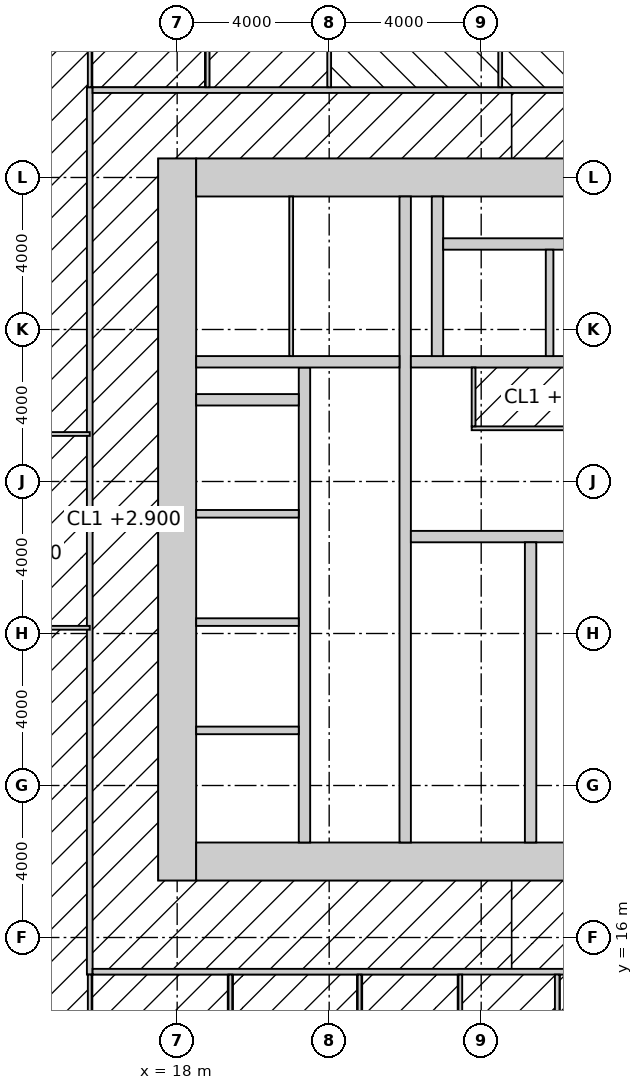
"""IFC4 building model, lengths in metres.
Left out: names, types, materials, properties, quantities, classifications, styles, units other than length and angle.
Written with IfcOpenShell. Run it as: python <this file> out.ifc"""

import sys

from ifc_helpers import new_model, si_unit, direction, frame, frame_2d, origin, place, context, subcontext, project, spatial, rectangle, extrude, element, fill, save


model = new_model("IFC4")
c1 = context("Model", 3, precision=1e-05, world=origin(), true_north=direction((0.0, 1.0)))
c2 = subcontext(c1, "Body", "Model", "MODEL_VIEW")
j1 = project(units=[si_unit("LENGTHUNIT", "METRE"), si_unit("PLANEANGLEUNIT", "RADIAN")], contexts=[c1])
p1 = place(None, origin())
s1 = spatial("IfcSite", under=j1, at=p1, CompositionType="ELEMENT")
p2 = place(p1, origin())
s2 = spatial("IfcBuilding", under=s1, at=p2, CompositionType="ELEMENT")
p3 = place(p2, frame((0.0, 0.0, 81.4)))
s3 = spatial("IfcBuildingStorey", under=s2, at=p3, CompositionType="ELEMENT", Elevation=81.4)
p4 = place(p3, frame((18.0, 17.5, -0.15), z_axis=(0.0, 0.0, 1.0), x_axis=(0.0, 1.0, 0.0)))
e1 = element("IfcWall", 1, at=p4, inside=s3, PredefinedType="SHEAR", context=c2, shape_type="SweptSolid", body=[
    extrude(rectangle(XDim=19.0, YDim=1.0, at=frame_2d((9.5, 0.0))), origin(), (0.0, 0.0, 1.0), 4.0),
])
p5 = place(p3, frame((18.5, 18.0, -0.15), z_axis=(0.0, 0.0, 1.0), x_axis=(1.0, 0.0, 0.0)))
e2 = element("IfcWall", 2, at=p5, inside=s3, PredefinedType="SHEAR", context=c2, shape_type="SweptSolid", body=[
    extrude(rectangle(XDim=17.6, YDim=1.0, at=frame_2d((8.8, 0.0))), origin(), (0.0, 0.0, 1.0), 4.0),
])
p6 = place(p5, frame((3.45, 0.0, 0.15)))
e3 = element("IfcOpeningElement", 3, at=p6, cuts=e2, PredefinedType="OPENING", context=c2, shape_type="SweptSolid", body=[
    extrude(rectangle(XDim=1.5, YDim=2.4, at=frame_2d((0.75, 1.2))), frame((0.0, 0.51, 0.0), z_axis=(0.0, -1.0, 0.0), x_axis=(1.0, 0.0, 0.0)), (0.0, 0.0, 1.0), 1.02),
])
p7 = place(p3, frame((18.5, 36.0, -0.15), z_axis=(0.0, 0.0, 1.0), x_axis=(1.0, 0.0, 0.0)))
e4 = element("IfcWall", 4, at=p7, inside=s3, PredefinedType="SHEAR", context=c2, shape_type="SweptSolid", body=[
    extrude(rectangle(XDim=17.6, YDim=1.0, at=frame_2d((8.8, 0.0))), origin(), (0.0, 0.0, 1.0), 4.0),
])
p8 = place(p3, frame((24.0, 18.5, -0.15), z_axis=(0.0, 0.0, 1.0), x_axis=(0.0, 1.0, 0.0)))
e5 = element("IfcWall", 5, at=p8, inside=s3, PredefinedType="SHEAR", context=c2, shape_type="SweptSolid", body=[
    extrude(rectangle(XDim=17.0, YDim=0.3, at=frame_2d((8.5, 0.0))), origin(), (0.0, 0.0, 1.0), 4.0),
])
p9 = place(p8, frame((9.6, 0.0, 0.15)))
e6 = element("IfcOpeningElement", 6, at=p9, cuts=e5, PredefinedType="OPENING", context=c2, shape_type="SweptSolid", body=[
    extrude(rectangle(XDim=1.5, YDim=2.4, at=frame_2d((0.75, 1.2))), frame((0.0, 0.16, 0.0), z_axis=(0.0, -1.0, 0.0), x_axis=(1.0, 0.0, 0.0)), (0.0, 0.0, 1.0), 0.32),
])
p10 = place(p3, frame((24.15, 26.55, -0.15), z_axis=(0.0, 0.0, 1.0), x_axis=(1.0, 0.0, 0.0)))
e7 = element("IfcWall", 7, at=p10, inside=s3, PredefinedType="SHEAR", context=c2, shape_type="SweptSolid", body=[
    extrude(rectangle(XDim=11.25, YDim=0.3, at=frame_2d((5.625, 0.0))), origin(), (0.0, 0.0, 1.0), 4.0),
])
p11 = place(p10, frame((9.25, 0.0, 0.15)))
e8 = element("IfcOpeningElement", 8, at=p11, cuts=e7, PredefinedType="OPENING", context=c2, shape_type="SweptSolid", body=[
    extrude(rectangle(XDim=1.0, YDim=2.2, at=frame_2d((0.5, 1.1))), frame((0.0, 0.16, 0.0), z_axis=(0.0, -1.0, 0.0), x_axis=(1.0, 0.0, 0.0)), (0.0, 0.0, 1.0), 0.32),
])
p12 = place(p10, frame((4.9, 0.0, 0.15)))
e9 = element("IfcOpeningElement", 9, at=p12, cuts=e7, PredefinedType="OPENING", context=c2, shape_type="SweptSolid", body=[
    extrude(rectangle(XDim=1.5, YDim=2.4, at=frame_2d((0.75, 1.2))), frame((0.0, 0.16, 0.0), z_axis=(0.0, -1.0, 0.0), x_axis=(1.0, 0.0, 0.0)), (0.0, 0.0, 1.0), 0.32),
])
p13 = place(p3, frame((27.3, 18.5, -0.15), z_axis=(0.0, 0.0, 1.0), x_axis=(0.0, 1.0, 0.0)))
e10 = element("IfcWall", 10, at=p13, inside=s3, PredefinedType="SHEAR", context=c2, shape_type="SweptSolid", body=[
    extrude(rectangle(XDim=7.9, YDim=0.3, at=frame_2d((3.95, 0.0))), origin(), (0.0, 0.0, 1.0), 4.0),
])
p14 = place(p13, frame((6.4, 0.0, 0.15)))
e11 = element("IfcOpeningElement", 11, at=p14, cuts=e10, PredefinedType="OPENING", context=c2, shape_type="SweptSolid", body=[
    extrude(rectangle(XDim=1.0, YDim=2.2, at=frame_2d((0.5, 1.1))), frame((0.0, 0.16, 0.0), z_axis=(0.0, -1.0, 0.0), x_axis=(1.0, 0.0, 0.0)), (0.0, 0.0, 1.0), 0.32),
])
p15 = place(p3, frame((24.15, 31.15, -0.15), z_axis=(0.0, 0.0, 1.0), x_axis=(1.0, 0.0, 0.0)))
e12 = element("IfcWall", 12, at=p15, inside=s3, PredefinedType="SHEAR", context=c2, shape_type="SweptSolid", body=[
    extrude(rectangle(XDim=11.25, YDim=0.3, at=frame_2d((5.625, 0.0))), origin(), (0.0, 0.0, 1.0), 4.0),
])
p16 = place(p15, frame((7.25, 0.0, 0.15)))
e13 = element("IfcOpeningElement", 13, at=p16, cuts=e12, PredefinedType="OPENING", context=c2, shape_type="SweptSolid", body=[
    extrude(rectangle(XDim=1.4, YDim=2.4, at=frame_2d((0.7, 1.2))), frame((0.0, 0.16, 0.0), z_axis=(0.0, -1.0, 0.0), x_axis=(1.0, 0.0, 0.0)), (0.0, 0.0, 1.0), 0.32),
])
p17 = place(p3, frame((21.35, 18.5, -0.15), z_axis=(0.0, 0.0, 1.0), x_axis=(0.0, 1.0, 0.0)))
e14 = element("IfcWall", 14, at=p17, inside=s3, PredefinedType="SHEAR", context=c2, shape_type="SweptSolid", body=[
    extrude(rectangle(XDim=12.5, YDim=0.3, at=frame_2d((6.25, 0.0))), origin(), (0.0, 0.0, 1.0), 4.0),
])
p18 = place(p17, frame((0.875, 0.0, 0.15)))
e15 = element("IfcOpeningElement", 15, at=p18, cuts=e14, PredefinedType="OPENING", context=c2, shape_type="SweptSolid", body=[
    extrude(rectangle(XDim=1.1, YDim=2.2, at=frame_2d((0.55, 1.1))), frame((0.0, 0.16, 0.0), z_axis=(0.0, -1.0, 0.0), x_axis=(1.0, 0.0, 0.0)), (0.0, 0.0, 1.0), 0.32),
])
p19 = place(p17, frame((3.825, 0.0, 0.15)))
e16 = element("IfcOpeningElement", 16, at=p19, cuts=e14, PredefinedType="OPENING", context=c2, shape_type="SweptSolid", body=[
    extrude(rectangle(XDim=1.1, YDim=2.2, at=frame_2d((0.55, 1.1))), frame((0.0, 0.16, 0.0), z_axis=(0.0, -1.0, 0.0), x_axis=(1.0, 0.0, 0.0)), (0.0, 0.0, 1.0), 0.32),
])
p20 = place(p17, frame((6.675, 0.0, 0.15)))
e17 = element("IfcOpeningElement", 17, at=p20, cuts=e14, PredefinedType="OPENING", context=c2, shape_type="SweptSolid", body=[
    extrude(rectangle(XDim=1.1, YDim=2.2, at=frame_2d((0.55, 1.1))), frame((0.0, 0.16, 0.0), z_axis=(0.0, -1.0, 0.0), x_axis=(1.0, 0.0, 0.0)), (0.0, 0.0, 1.0), 0.32),
])
p21 = place(p17, frame((9.575, 0.0, 0.15)))
e18 = element("IfcOpeningElement", 18, at=p21, cuts=e14, PredefinedType="OPENING", context=c2, shape_type="SweptSolid", body=[
    extrude(rectangle(XDim=1.1, YDim=2.2, at=frame_2d((0.55, 1.1))), frame((0.0, 0.16, 0.0), z_axis=(0.0, -1.0, 0.0), x_axis=(1.0, 0.0, 0.0)), (0.0, 0.0, 1.0), 0.32),
])
p22 = place(p3, frame((18.5, 31.15, -0.15), z_axis=(0.0, 0.0, 1.0), x_axis=(1.0, 0.0, 0.0)))
e19 = element("IfcWall", 19, at=p22, inside=s3, PredefinedType="SHEAR", context=c2, shape_type="SweptSolid", body=[
    extrude(rectangle(XDim=5.35, YDim=0.3, at=frame_2d((2.675, 0.0))), origin(), (0.0, 0.0, 1.0), 4.0),
])
p23 = place(p22, frame((3.4, 0.0, 0.15)))
e20 = element("IfcOpeningElement", 20, at=p23, cuts=e19, PredefinedType="OPENING", context=c2, shape_type="SweptSolid", body=[
    extrude(rectangle(XDim=1.0, YDim=2.2, at=frame_2d((0.5, 1.1))), frame((0.0, 0.16, 0.0), z_axis=(0.0, -1.0, 0.0), x_axis=(1.0, 0.0, 0.0)), (0.0, 0.0, 1.0), 0.32),
])
p24 = place(p3, frame((18.5, 30.15, -0.15), z_axis=(0.0, 0.0, 1.0), x_axis=(1.0, 0.0, 0.0)))
e21 = element("IfcWall", 21, at=p24, inside=s3, PredefinedType="SHEAR", context=c2, shape_type="SweptSolid", body=[
    extrude(rectangle(XDim=2.7, YDim=0.3, at=frame_2d((1.35, 0.0))), origin(), (0.0, 0.0, 1.0), 4.0),
])
p25 = place(p3, frame((24.85, 31.3, -0.15), z_axis=(0.0, 0.0, 1.0), x_axis=(0.0, 1.0, 0.0)))
e22 = element("IfcWall", 22, at=p25, inside=s3, PredefinedType="SHEAR", context=c2, shape_type="SweptSolid", body=[
    extrude(rectangle(XDim=4.2, YDim=0.3, at=frame_2d((2.1, 0.0))), origin(), (0.0, 0.0, 1.0), 4.0),
])
p26 = place(p3, frame((25.0, 34.25, -0.15), z_axis=(0.0, 0.0, 1.0), x_axis=(1.0, 0.0, 0.0)))
e23 = element("IfcWall", 23, at=p26, inside=s3, PredefinedType="SHEAR", context=c2, shape_type="SweptSolid", body=[
    extrude(rectangle(XDim=8.6, YDim=0.3, at=frame_2d((4.3, 0.0))), origin(), (0.0, 0.0, 1.0), 4.0),
])
p27 = place(p3, frame((27.8, 31.3, -0.15), z_axis=(0.0, 0.0, 1.0), x_axis=(0.0, 1.0, 0.0)))
e24 = element("IfcWall", 24, at=p27, inside=s3, PredefinedType="SOLIDWALL", context=c2, shape_type="SweptSolid", body=[
    extrude(rectangle(XDim=2.8, YDim=0.2, at=frame_2d((1.4, 0.0))), origin(), (0.0, 0.0, 1.0), 4.0),
])
for number, where, z_axis, x_axis in (
    (25, (18.5, 21.45, -0.15), (0.0, 0.0, 1.0), (1.0, 0.0, 0.0)),
    (26, (18.5, 24.3, -0.15), (0.0, 0.0, 1.0), (1.0, 0.0, 0.0)),
    (27, (18.5, 27.15, -0.15), (0.0, 0.0, 1.0), (1.0, 0.0, 0.0)),
):
    element("IfcWall", number, at=place(p3, frame(where, z_axis=z_axis, x_axis=x_axis)), inside=s3, PredefinedType="SOLIDWALL", context=c2, shape_type="SweptSolid", body=[
        extrude(rectangle(XDim=2.7, YDim=0.2, at=frame_2d((1.35, 0.0))), origin(), (0.0, 0.0, 1.0), 4.0),
    ])
p28 = place(p3, frame((21.0, 31.3, 0.0), z_axis=(0.0, 0.0, 1.0), x_axis=(0.0, 1.0, 0.0)))
e28 = element("IfcWall", 28, at=p28, inside=s3, PredefinedType="PARTITIONING", context=c2, shape_type="SweptSolid", body=[
    extrude(rectangle(XDim=4.2, YDim=0.1, at=frame_2d((2.1, 0.0))), origin(), (0.0, 0.0, 1.0), 3.85),
])
p29 = place(p28, frame((1.55, 0.0, 0.0)))
e29 = element("IfcOpeningElement", 29, at=p29, cuts=e28, PredefinedType="OPENING", context=c2, shape_type="SweptSolid", body=[
    extrude(rectangle(XDim=1.0, YDim=2.2, at=frame_2d((0.5, 1.1))), frame((0.0, 0.06, 0.0), z_axis=(0.0, -1.0, 0.0), x_axis=(1.0, 0.0, 0.0)), (0.0, 0.0, 1.0), 0.12),
])
p30 = place(p3, frame((25.75, 29.4, 0.0), z_axis=(0.0, 0.0, 1.0), x_axis=(1.0, 0.0, 0.0)))
e30 = element("IfcWall", 30, at=p30, inside=s3, PredefinedType="PARTITIONING", context=c2, shape_type="SweptSolid", body=[
    extrude(rectangle(XDim=4.7, YDim=0.1, at=frame_2d((2.35, 0.0))), origin(), (0.0, 0.0, 1.0), 3.85),
])
p31 = place(p30, frame((1.85, 0.0, 0.0)))
e31 = element("IfcOpeningElement", 31, at=p31, cuts=e30, PredefinedType="OPENING", context=c2, shape_type="SweptSolid", body=[
    extrude(rectangle(XDim=1.0, YDim=2.2, at=frame_2d((0.5, 1.1))), frame((0.0, 0.06, 0.0), z_axis=(0.0, -1.0, 0.0), x_axis=(1.0, 0.0, 0.0)), (0.0, 0.0, 1.0), 0.12),
])
p32 = place(p3, frame((25.8, 29.45, 0.0), z_axis=(0.0, 0.0, 1.0), x_axis=(0.0, 1.0, 0.0)))
e32 = element("IfcWall", 32, at=p32, inside=s3, PredefinedType="PARTITIONING", context=c2, shape_type="SweptSolid", body=[
    extrude(rectangle(XDim=1.55, YDim=0.1, at=frame_2d((0.775, 0.0))), origin(), (0.0, 0.0, 1.0), 3.85),
])
p33 = place(p3, frame((15.7, 15.025, 0.0), z_axis=(0.0, 0.0, 1.0), x_axis=(0.0, 1.0, 0.0)))
e33 = element("IfcWall", 33, at=p33, inside=s3, PredefinedType="PARTITIONING", context=c2, shape_type="SweptSolid", body=[
    extrude(rectangle(XDim=23.35, YDim=0.15, at=frame_2d((11.675, 0.0))), origin(), (0.0, 0.0, 1.0), 3.85),
])
p34 = place(p33, frame((10.775, 0.0, 0.0)))
e34 = element("IfcOpeningElement", 34, at=p34, cuts=e33, PredefinedType="OPENING", context=c2, shape_type="SweptSolid", body=[
    extrude(rectangle(XDim=1.8, YDim=2.4, at=frame_2d((0.9, 1.2))), frame((0.0, 0.085, 0.0), z_axis=(0.0, -1.0, 0.0), x_axis=(1.0, 0.0, 0.0)), (0.0, 0.0, 1.0), 0.17),
])
p35 = place(p3, frame((15.775, 15.1, 0.0), z_axis=(0.0, 0.0, 1.0), x_axis=(1.0, 0.0, 0.0)))
e35 = element("IfcWall", 35, at=p35, inside=s3, PredefinedType="PARTITIONING", context=c2, shape_type="SweptSolid", body=[
    extrude(rectangle(XDim=22.05, YDim=0.15, at=frame_2d((11.025, 0.0))), origin(), (0.0, 0.0, 1.0), 3.85),
])
p36 = place(p3, frame((15.775, 38.3, 0.0), z_axis=(0.0, 0.0, 1.0), x_axis=(1.0, 0.0, 0.0)))
e36 = element("IfcWall", 36, at=p36, inside=s3, PredefinedType="PARTITIONING", context=c2, shape_type="SweptSolid", body=[
    extrude(rectangle(XDim=22.05, YDim=0.15, at=frame_2d((11.025, 0.0))), origin(), (0.0, 0.0, 1.0), 3.85),
])
p37 = place(p36, frame((7.975, 0.0, 0.0)))
e37 = element("IfcOpeningElement", 37, at=p37, cuts=e36, PredefinedType="OPENING", context=c2, shape_type="SweptSolid", body=[
    extrude(rectangle(XDim=0.9, YDim=2.1, at=frame_2d((0.45, 1.05))), frame((0.0, 0.085, 0.0), z_axis=(0.0, -1.0, 0.0), x_axis=(1.0, 0.0, 0.0)), (0.0, 0.0, 1.0), 0.17),
])
p38 = place(p36, frame((11.725, 0.0, 0.0)))
e38 = element("IfcOpeningElement", 38, at=p38, cuts=e36, PredefinedType="OPENING", context=c2, shape_type="SweptSolid", body=[
    extrude(rectangle(XDim=1.0, YDim=2.1, at=frame_2d((0.5, 1.05))), frame((0.0, 0.085, 0.0), z_axis=(0.0, -1.0, 0.0), x_axis=(1.0, 0.0, 0.0)), (0.0, 0.0, 1.0), 0.17),
])
p39 = place(p36, frame((15.575, 0.0, 0.0)))
e39 = element("IfcOpeningElement", 39, at=p39, cuts=e36, PredefinedType="OPENING", context=c2, shape_type="SweptSolid", body=[
    extrude(rectangle(XDim=0.9, YDim=2.1, at=frame_2d((0.45, 1.05))), frame((0.0, 0.085, 0.0), z_axis=(0.0, -1.0, 0.0), x_axis=(1.0, 0.0, 0.0)), (0.0, 0.0, 1.0), 0.17),
])
p40 = place(p3, frame((22.0, 38.375, 0.0), z_axis=(0.0, 0.0, 1.0), x_axis=(0.0, 1.0, 0.0)))
e40 = element("IfcWall", 40, at=p40, inside=s3, PredefinedType="PARTITIONING", context=c2, shape_type="SweptSolid", body=[
    extrude(rectangle(XDim=3.675, YDim=0.1, at=frame_2d((1.837, 0.0))), origin(), (0.0, 0.0, 1.0), 2.95),
])
p41 = place(p3, frame((26.5, 38.375, 0.0), z_axis=(0.0, 0.0, 1.0), x_axis=(0.0, 1.0, 0.0)))
e41 = element("IfcWall", 41, at=p41, inside=s3, PredefinedType="PARTITIONING", context=c2, shape_type="SweptSolid", body=[
    extrude(rectangle(XDim=3.575, YDim=0.1, at=frame_2d((1.788, 0.0))), origin(), (0.0, 0.0, 1.0), 3.85),
])
p42 = place(p3, frame((28.0, 0.3, 0.0), z_axis=(0.0, 0.0, 1.0), x_axis=(0.0, 1.0, 0.0)))
e42 = element("IfcWall", 42, at=p42, inside=s3, PredefinedType="PARTITIONING", context=c2, shape_type="SweptSolid", body=[
    extrude(rectangle(XDim=14.725, YDim=0.12, at=frame_2d((7.362, 0.0))), origin(), (0.0, 0.0, 1.0), 3.85),
])
p43 = place(p3, frame((15.7, 10.35, 0.0), z_axis=(0.0, 0.0, 1.0), x_axis=(0.0, 1.0, 0.0)))
e43 = element("IfcWall", 43, at=p43, inside=s3, PredefinedType="PARTITIONING", context=c2, shape_type="SweptSolid", body=[
    extrude(rectangle(XDim=4.675, YDim=0.1, at=frame_2d((2.337, 0.0))), origin(), (0.0, 0.0, 1.0), 3.85),
])
for number, where, z_axis, x_axis in (
    (44, (15.7, 38.375, 0.0), (0.0, 0.0, 1.0), (0.0, 1.0, 0.0)),
    (45, (18.8, 38.375, 0.0), (0.0, 0.0, 1.0), (0.0, 1.0, 0.0)),
):
    element("IfcWall", number, at=place(p3, frame(where, z_axis=z_axis, x_axis=x_axis)), inside=s3, PredefinedType="PARTITIONING", context=c2, shape_type="SweptSolid", body=[
        extrude(rectangle(XDim=3.475, YDim=0.1, at=frame_2d((1.738, 0.0))), origin(), (0.0, 0.0, 1.0), 3.85),
    ])
for number, where, z_axis, x_axis in (
    (46, (19.4, 10.35, 0.0), (0.0, 0.0, 1.0), (0.0, 1.0, 0.0)),
    (47, (22.8, 10.35, 0.0), (0.0, 0.0, 1.0), (0.0, 1.0, 0.0)),
    (48, (25.45, 10.35, 0.0), (0.0, 0.0, 1.0), (0.0, 1.0, 0.0)),
):
    element("IfcWall", number, at=place(p3, frame(where, z_axis=z_axis, x_axis=x_axis)), inside=s3, PredefinedType="PARTITIONING", context=c2, shape_type="SweptSolid", body=[
        extrude(rectangle(XDim=4.675, YDim=0.1, at=frame_2d((2.337, 0.0))), origin(), (0.0, 0.0, 1.0), 3.85),
    ])
p44 = place(p3, frame((15.7, 29.25, 0.0), z_axis=(0.0, 0.0, 1.0), x_axis=(-1.0, 0.0, 0.0)))
e49 = element("IfcWall", 49, at=p44, inside=s3, PredefinedType="PARTITIONING", context=c2, shape_type="SweptSolid", body=[
    extrude(rectangle(XDim=4.5, YDim=0.1, at=frame_2d((2.25, 0.0))), origin(), (0.0, 0.0, 1.0), 3.85),
])
p45 = place(p3, frame((11.2, 24.15, 0.0), z_axis=(0.0, 0.0, 1.0), x_axis=(1.0, 0.0, 0.0)))
e50 = element("IfcWall", 50, at=p45, inside=s3, PredefinedType="PARTITIONING", context=c2, shape_type="SweptSolid", body=[
    extrude(rectangle(XDim=4.5, YDim=0.1, at=frame_2d((2.25, 0.0))), origin(), (0.0, 0.0, 1.0), 2.95),
])
p46 = place(p14, origin())
e51 = element("IfcDoor", 51, at=p46, inside=s3, OperationType="SINGLE_SWING_RIGHT", PredefinedType="DOOR", context=c2, shape_type="SweptSolid", body=[
    extrude(rectangle(XDim=1.0, YDim=2.2, at=frame_2d((0.5, 1.1))), frame((0.0, 0.025, 0.0), z_axis=(0.0, -1.0, 0.0), x_axis=(1.0, 0.0, 0.0)), (0.0, 0.0, 1.0), 0.05),
])
fill(e11, e51)
p47 = place(p9, origin())
e52 = element("IfcDoor", 52, at=p47, inside=s3, OperationType="DOUBLE_DOOR_DOUBLE_SWING", PredefinedType="DOOR", context=c2, shape_type="SweptSolid", body=[
    extrude(rectangle(XDim=1.5, YDim=2.4, at=frame_2d((0.75, 1.2))), frame((0.0, 0.025, 0.0), z_axis=(0.0, -1.0, 0.0), x_axis=(1.0, 0.0, 0.0)), (0.0, 0.0, 1.0), 0.05),
])
fill(e6, e52)
p48 = place(p23, origin())
e53 = element("IfcDoor", 53, at=p48, inside=s3, OperationType="SINGLE_SWING_LEFT", PredefinedType="DOOR", context=c2, shape_type="SweptSolid", body=[
    extrude(rectangle(XDim=1.0, YDim=2.2, at=frame_2d((0.5, 1.1))), frame((0.0, 0.025, 0.0), z_axis=(0.0, -1.0, 0.0), x_axis=(1.0, 0.0, 0.0)), (0.0, 0.0, 1.0), 0.05),
])
fill(e20, e53)
p49 = place(p29, origin())
e54 = element("IfcDoor", 54, at=p49, inside=s3, OperationType="SINGLE_SWING_LEFT", PredefinedType="DOOR", context=c2, shape_type="SweptSolid", body=[
    extrude(rectangle(XDim=1.0, YDim=2.2, at=frame_2d((0.5, 1.1))), frame((0.0, 0.025, 0.0), z_axis=(0.0, -1.0, 0.0), x_axis=(1.0, 0.0, 0.0)), (0.0, 0.0, 1.0), 0.05),
])
fill(e29, e54)
p50 = place(p31, origin())
e55 = element("IfcDoor", 55, at=p50, inside=s3, OperationType="SINGLE_SWING_LEFT", PredefinedType="DOOR", context=c2, shape_type="SweptSolid", body=[
    extrude(rectangle(XDim=1.0, YDim=2.2, at=frame_2d((0.5, 1.1))), frame((0.0, 0.025, 0.0), z_axis=(0.0, -1.0, 0.0), x_axis=(1.0, 0.0, 0.0)), (0.0, 0.0, 1.0), 0.05),
])
fill(e31, e55)
p51 = place(p6, origin())
e56 = element("IfcDoor", 56, at=p51, inside=s3, OperationType="DOUBLE_DOOR_DOUBLE_SWING", PredefinedType="DOOR", context=c2, shape_type="SweptSolid", body=[
    extrude(rectangle(XDim=1.5, YDim=2.4, at=frame_2d((0.75, 1.2))), frame((0.0, 0.025, 0.0), z_axis=(0.0, -1.0, 0.0), x_axis=(1.0, 0.0, 0.0)), (0.0, 0.0, 1.0), 0.05),
])
fill(e3, e56)
p52 = place(p37, origin())
e57 = element("IfcDoor", 57, at=p52, inside=s3, OperationType="SINGLE_SWING_LEFT", PredefinedType="DOOR", context=c2, shape_type="SweptSolid", body=[
    extrude(rectangle(XDim=0.9, YDim=2.1, at=frame_2d((0.45, 1.05))), frame((0.0, 0.025, 0.0), z_axis=(0.0, -1.0, 0.0), x_axis=(1.0, 0.0, 0.0)), (0.0, 0.0, 1.0), 0.05),
])
fill(e37, e57)
p53 = place(p38, origin())
e58 = element("IfcDoor", 58, at=p53, inside=s3, OperationType="SLIDING_TO_LEFT", PredefinedType="DOOR", context=c2, shape_type="SweptSolid", body=[
    extrude(rectangle(XDim=1.0, YDim=2.1, at=frame_2d((0.5, 1.05))), frame((0.0, 0.025, 0.0), z_axis=(0.0, -1.0, 0.0), x_axis=(1.0, 0.0, 0.0)), (0.0, 0.0, 1.0), 0.05),
])
fill(e38, e58)
p54 = place(p34, origin())
e59 = element("IfcDoor", 59, at=p54, inside=s3, OperationType="DOUBLE_DOOR_DOUBLE_SWING", PredefinedType="DOOR", context=c2, shape_type="SweptSolid", body=[
    extrude(rectangle(XDim=1.8, YDim=2.4, at=frame_2d((0.9, 1.2))), frame((0.0, 0.025, 0.0), z_axis=(0.0, -1.0, 0.0), x_axis=(1.0, 0.0, 0.0)), (0.0, 0.0, 1.0), 0.05),
])
fill(e34, e59)
p55 = place(p18, origin())
e60 = element("IfcDoor", 60, at=p55, inside=s3, OperationType="DOUBLE_DOOR_SLIDING", PredefinedType="DOOR", context=c2, shape_type="SweptSolid", body=[
    extrude(rectangle(XDim=1.1, YDim=2.2, at=frame_2d((0.55, 1.1))), frame((0.0, 0.025, 0.0), z_axis=(0.0, -1.0, 0.0), x_axis=(1.0, 0.0, 0.0)), (0.0, 0.0, 1.0), 0.05),
])
fill(e15, e60)
p56 = place(p19, origin())
e61 = element("IfcDoor", 61, at=p56, inside=s3, OperationType="DOUBLE_DOOR_SLIDING", PredefinedType="DOOR", context=c2, shape_type="SweptSolid", body=[
    extrude(rectangle(XDim=1.1, YDim=2.2, at=frame_2d((0.55, 1.1))), frame((0.0, 0.025, 0.0), z_axis=(0.0, -1.0, 0.0), x_axis=(1.0, 0.0, 0.0)), (0.0, 0.0, 1.0), 0.05),
])
fill(e16, e61)
p57 = place(p20, origin())
e62 = element("IfcDoor", 62, at=p57, inside=s3, OperationType="DOUBLE_DOOR_SLIDING", PredefinedType="DOOR", context=c2, shape_type="SweptSolid", body=[
    extrude(rectangle(XDim=1.1, YDim=2.2, at=frame_2d((0.55, 1.1))), frame((0.0, 0.025, 0.0), z_axis=(0.0, -1.0, 0.0), x_axis=(1.0, 0.0, 0.0)), (0.0, 0.0, 1.0), 0.05),
])
fill(e17, e62)
p58 = place(p21, origin())
e63 = element("IfcDoor", 63, at=p58, inside=s3, OperationType="DOUBLE_DOOR_SLIDING", PredefinedType="DOOR", context=c2, shape_type="SweptSolid", body=[
    extrude(rectangle(XDim=1.1, YDim=2.2, at=frame_2d((0.55, 1.1))), frame((0.0, 0.025, 0.0), z_axis=(0.0, -1.0, 0.0), x_axis=(1.0, 0.0, 0.0)), (0.0, 0.0, 1.0), 0.05),
])
fill(e18, e63)
save(model, sys.argv[1])
